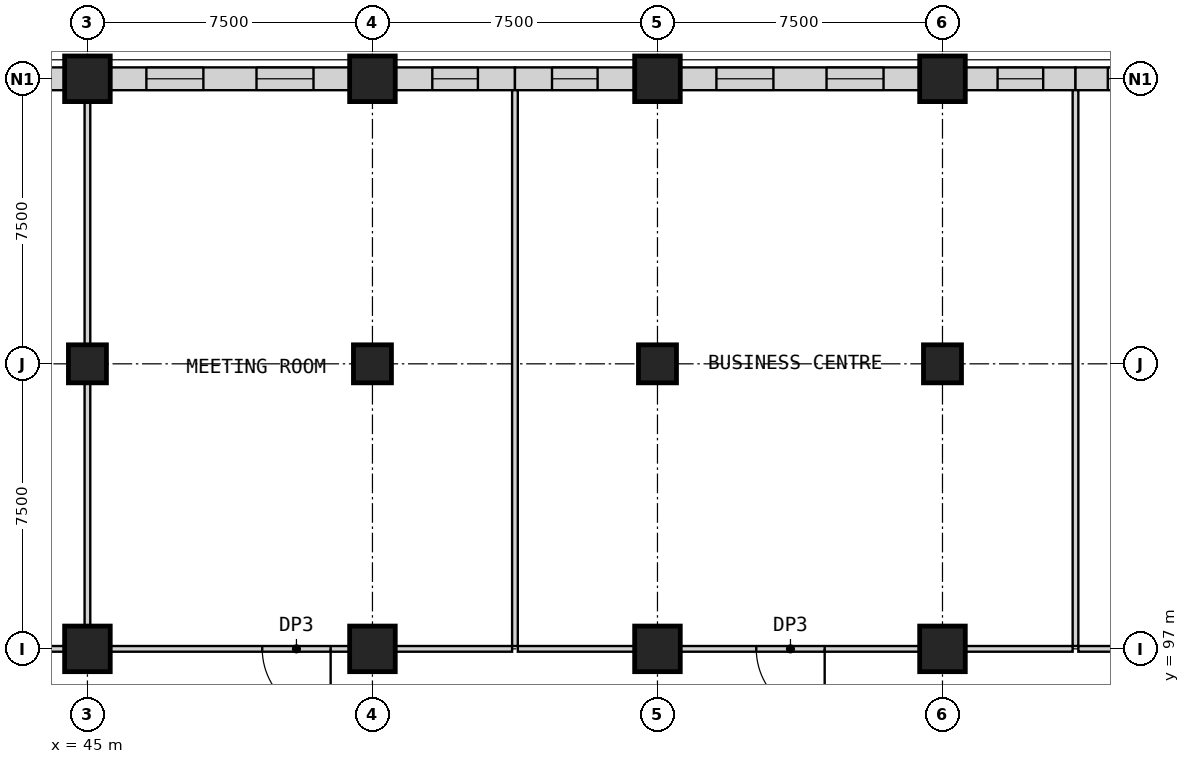
"""IFC4 building model, lengths in metres.
Left out: names, types, materials, properties, quantities, classifications, styles, units other than length and angle.
Written with IfcOpenShell. Run it as: python <this file> out.ifc"""

import sys

from ifc_helpers import new_model, si_unit, direction, frame, frame_2d, origin, origin_2d, place, context, subcontext, project, spatial, rectangle, extrude, element, fill, save


model = new_model("IFC4")
c1 = context("Model", 3, precision=1e-05, world=origin(), true_north=direction((0.0, 1.0)))
c2 = subcontext(c1, "Body", "Model", "MODEL_VIEW")
j1 = project(units=[si_unit("LENGTHUNIT", "METRE"), si_unit("PLANEANGLEUNIT", "RADIAN")], contexts=[c1])
p1 = place(None, origin())
s1 = spatial("IfcSite", under=j1, at=p1, CompositionType="ELEMENT")
p2 = place(p1, origin())
s2 = spatial("IfcBuilding", under=s1, at=p2, CompositionType="ELEMENT")
p3 = place(p2, frame((0.0, 0.0, 23.5)))
s3 = spatial("IfcBuildingStorey", under=s2, at=p3, CompositionType="ELEMENT", Elevation=23.5)
p4 = place(p3, frame((45.0, 97.0, 0.0), z_axis=(0.0, 0.0, 1.0), x_axis=(1.0, 0.0, 0.0)))
e1 = element("IfcColumn", 1, at=p4, inside=s3, PredefinedType="COLUMN", context=c2, shape_type="SweptSolid", body=[
    extrude(rectangle(XDim=1.2, YDim=1.2, at=origin_2d()), origin(), (0.0, 0.0, 1.0), 5.5),
])
p5 = place(p3, frame((45.0, 104.5, 0.0), z_axis=(0.0, 0.0, 1.0), x_axis=(1.0, 0.0, 0.0)))
e2 = element("IfcColumn", 2, at=p5, inside=s3, PredefinedType="COLUMN", context=c2, shape_type="SweptSolid", body=[
    extrude(rectangle(XDim=1.0, YDim=1.0, at=origin_2d()), origin(), (0.0, 0.0, 1.0), 5.5),
])
p6 = place(p3, frame((52.5, 97.0, 0.0), z_axis=(0.0, 0.0, 1.0), x_axis=(1.0, 0.0, 0.0)))
e3 = element("IfcColumn", 3, at=p6, inside=s3, PredefinedType="COLUMN", context=c2, shape_type="SweptSolid", body=[
    extrude(rectangle(XDim=1.2, YDim=1.2, at=origin_2d()), origin(), (0.0, 0.0, 1.0), 5.5),
])
p7 = place(p3, frame((52.5, 104.5, 0.0), z_axis=(0.0, 0.0, 1.0), x_axis=(1.0, 0.0, 0.0)))
e4 = element("IfcColumn", 4, at=p7, inside=s3, PredefinedType="COLUMN", context=c2, shape_type="SweptSolid", body=[
    extrude(rectangle(XDim=1.0, YDim=1.0, at=origin_2d()), origin(), (0.0, 0.0, 1.0), 5.5),
])
p8 = place(p3, frame((60.0, 97.0, 0.0), z_axis=(0.0, 0.0, 1.0), x_axis=(1.0, 0.0, 0.0)))
e5 = element("IfcColumn", 5, at=p8, inside=s3, PredefinedType="COLUMN", context=c2, shape_type="SweptSolid", body=[
    extrude(rectangle(XDim=1.2, YDim=1.2, at=origin_2d()), origin(), (0.0, 0.0, 1.0), 5.5),
])
p9 = place(p3, frame((60.0, 104.5, 0.0), z_axis=(0.0, 0.0, 1.0), x_axis=(1.0, 0.0, 0.0)))
e6 = element("IfcColumn", 6, at=p9, inside=s3, PredefinedType="COLUMN", context=c2, shape_type="SweptSolid", body=[
    extrude(rectangle(XDim=1.0, YDim=1.0, at=origin_2d()), origin(), (0.0, 0.0, 1.0), 5.5),
])
p10 = place(p3, frame((67.5, 97.0, 0.0), z_axis=(0.0, 0.0, 1.0), x_axis=(1.0, 0.0, 0.0)))
e7 = element("IfcColumn", 7, at=p10, inside=s3, PredefinedType="COLUMN", context=c2, shape_type="SweptSolid", body=[
    extrude(rectangle(XDim=1.2, YDim=1.2, at=origin_2d()), origin(), (0.0, 0.0, 1.0), 5.5),
])
p11 = place(p3, frame((67.5, 104.5, 0.0), z_axis=(0.0, 0.0, 1.0), x_axis=(1.0, 0.0, 0.0)))
e8 = element("IfcColumn", 8, at=p11, inside=s3, PredefinedType="COLUMN", context=c2, shape_type="SweptSolid", body=[
    extrude(rectangle(XDim=1.0, YDim=1.0, at=origin_2d()), origin(), (0.0, 0.0, 1.0), 5.5),
])
for number, where, z_axis, x_axis in (
    (9, (45.0, 112.0, 0.0), (0.0, 0.0, 1.0), (1.0, 0.0, 0.0)),
    (10, (52.5, 112.0, 0.0), (0.0, 0.0, 1.0), (1.0, 0.0, 0.0)),
    (11, (60.0, 112.0, 0.0), (0.0, 0.0, 1.0), (1.0, 0.0, 0.0)),
    (12, (67.5, 112.0, 0.0), (0.0, 0.0, 1.0), (1.0, 0.0, 0.0)),
):
    element("IfcColumn", number, at=place(p3, frame(where, z_axis=z_axis, x_axis=x_axis)), inside=s3, PredefinedType="COLUMN", context=c2, shape_type="SweptSolid", body=[
        extrude(rectangle(XDim=1.2, YDim=1.2, at=origin_2d()), origin(), (0.0, 0.0, 1.0), 5.5),
    ])
p12 = place(p3, frame((44.4, 97.0, 0.0), z_axis=(0.0, 0.0, 1.0), x_axis=(-1.0, 0.0, 0.0)))
e13 = element("IfcWall", 13, at=p12, inside=s3, PredefinedType="PARTITIONING", context=c2, shape_type="SweptSolid", body=[
    extrude(rectangle(XDim=6.3, YDim=0.15, at=frame_2d((3.15, 0.0))), origin(), (0.0, 0.0, 1.0), 5.2),
])
p13 = place(p12, frame((4.0, 0.0, 0.0)))
e14 = element("IfcOpeningElement", 14, at=p13, cuts=e13, PredefinedType="OPENING", context=c2, shape_type="SweptSolid", body=[
    extrude(rectangle(XDim=1.8, YDim=2.4, at=frame_2d((0.9, 1.2))), frame((0.0, 0.085, 0.0), z_axis=(0.0, -1.0, 0.0), x_axis=(1.0, 0.0, 0.0)), (0.0, 0.0, 1.0), 0.17),
])
p14 = place(p3, frame((51.9, 97.0, 0.0), z_axis=(0.0, 0.0, 1.0), x_axis=(-1.0, 0.0, 0.0)))
e15 = element("IfcWall", 15, at=p14, inside=s3, PredefinedType="PARTITIONING", context=c2, shape_type="SweptSolid", body=[
    extrude(rectangle(XDim=6.3, YDim=0.15, at=frame_2d((3.15, 0.0))), origin(), (0.0, 0.0, 1.0), 5.2),
])
p15 = place(p14, frame((0.5, 0.0, 0.0)))
e16 = element("IfcOpeningElement", 16, at=p15, cuts=e15, PredefinedType="OPENING", context=c2, shape_type="SweptSolid", body=[
    extrude(rectangle(XDim=1.8, YDim=2.4, at=frame_2d((0.9, 1.2))), frame((0.0, 0.085, 0.0), z_axis=(0.0, -1.0, 0.0), x_axis=(1.0, 0.0, 0.0)), (0.0, 0.0, 1.0), 0.17),
])
for number, where, z_axis, x_axis in (
    (17, (53.1, 97.0, 0.0), (0.0, 0.0, 1.0), (1.0, 0.0, 0.0)),
    (18, (56.325, 97.0, 0.0), (0.0, 0.0, 1.0), (1.0, 0.0, 0.0)),
):
    element("IfcWall", number, at=place(p3, frame(where, z_axis=z_axis, x_axis=x_axis)), inside=s3, PredefinedType="PARTITIONING", context=c2, shape_type="SweptSolid", body=[
        extrude(rectangle(XDim=3.075, YDim=0.15, at=frame_2d((1.538, 0.0))), origin(), (0.0, 0.0, 1.0), 5.2),
    ])
p16 = place(p3, frame((66.9, 97.0, 0.0), z_axis=(0.0, 0.0, 1.0), x_axis=(-1.0, 0.0, 0.0)))
e19 = element("IfcWall", 19, at=p16, inside=s3, PredefinedType="PARTITIONING", context=c2, shape_type="SweptSolid", body=[
    extrude(rectangle(XDim=6.3, YDim=0.15, at=frame_2d((3.15, 0.0))), origin(), (0.0, 0.0, 1.0), 5.2),
])
p17 = place(p16, frame((2.5, 0.0, 0.0)))
e20 = element("IfcOpeningElement", 20, at=p17, cuts=e19, PredefinedType="OPENING", context=c2, shape_type="SweptSolid", body=[
    extrude(rectangle(XDim=1.8, YDim=2.4, at=frame_2d((0.9, 1.2))), frame((0.0, 0.085, 0.0), z_axis=(0.0, -1.0, 0.0), x_axis=(1.0, 0.0, 0.0)), (0.0, 0.0, 1.0), 0.17),
])
for number, where, z_axis, x_axis in (
    (21, (68.1, 97.0, 0.0), (0.0, 0.0, 1.0), (1.0, 0.0, 0.0)),
    (22, (71.075, 97.0, 0.0), (0.0, 0.0, 1.0), (1.0, 0.0, 0.0)),
):
    element("IfcWall", number, at=place(p3, frame(where, z_axis=z_axis, x_axis=x_axis)), inside=s3, PredefinedType="PARTITIONING", context=c2, shape_type="SweptSolid", body=[
        extrude(rectangle(XDim=2.825, YDim=0.15, at=frame_2d((1.413, 0.0))), origin(), (0.0, 0.0, 1.0), 5.2),
    ])
p18 = place(p3, frame((38.1, 112.0, 0.0), z_axis=(0.0, 0.0, 1.0), x_axis=(1.0, 0.0, 0.0)))
e23 = element("IfcWall", 23, at=p18, inside=s3, PredefinedType="PARTITIONING", context=c2, shape_type="SweptSolid", body=[
    extrude(rectangle(XDim=6.3, YDim=0.6, at=frame_2d((3.15, 0.0))), origin(), (0.0, 0.0, 1.0), 4.6),
])
p19 = place(p18, frame((0.951, 0.0, 0.9)))
e24 = element("IfcOpeningElement", 24, at=p19, cuts=e23, PredefinedType="OPENING", context=c2, shape_type="SweptSolid", body=[
    extrude(rectangle(XDim=1.5, YDim=2.8, at=frame_2d((0.75, 1.4))), frame((0.0, 0.31, 0.0), z_axis=(0.0, -1.0, 0.0), x_axis=(1.0, 0.0, 0.0)), (0.0, 0.0, 1.0), 0.62),
])
p20 = place(p18, frame((3.849, 0.0, 0.9)))
e25 = element("IfcOpeningElement", 25, at=p20, cuts=e23, PredefinedType="OPENING", context=c2, shape_type="SweptSolid", body=[
    extrude(rectangle(XDim=1.5, YDim=2.8, at=frame_2d((0.75, 1.4))), frame((0.0, 0.31, 0.0), z_axis=(0.0, -1.0, 0.0), x_axis=(1.0, 0.0, 0.0)), (0.0, 0.0, 1.0), 0.62),
])
p21 = place(p3, frame((45.6, 112.0, 0.0), z_axis=(0.0, 0.0, 1.0), x_axis=(1.0, 0.0, 0.0)))
e26 = element("IfcWall", 26, at=p21, inside=s3, PredefinedType="PARTITIONING", context=c2, shape_type="SweptSolid", body=[
    extrude(rectangle(XDim=6.3, YDim=0.6, at=frame_2d((3.15, 0.0))), origin(), (0.0, 0.0, 1.0), 4.6),
])
p22 = place(p21, frame((0.951, 0.0, 0.9)))
e27 = element("IfcOpeningElement", 27, at=p22, cuts=e26, PredefinedType="OPENING", context=c2, shape_type="SweptSolid", body=[
    extrude(rectangle(XDim=1.5, YDim=2.8, at=frame_2d((0.75, 1.4))), frame((0.0, 0.31, 0.0), z_axis=(0.0, -1.0, 0.0), x_axis=(1.0, 0.0, 0.0)), (0.0, 0.0, 1.0), 0.62),
])
p23 = place(p21, frame((3.849, 0.0, 0.9)))
e28 = element("IfcOpeningElement", 28, at=p23, cuts=e26, PredefinedType="OPENING", context=c2, shape_type="SweptSolid", body=[
    extrude(rectangle(XDim=1.5, YDim=2.8, at=frame_2d((0.75, 1.4))), frame((0.0, 0.31, 0.0), z_axis=(0.0, -1.0, 0.0), x_axis=(1.0, 0.0, 0.0)), (0.0, 0.0, 1.0), 0.62),
])
p24 = place(p3, frame((53.1, 112.0, 0.0), z_axis=(0.0, 0.0, 1.0), x_axis=(1.0, 0.0, 0.0)))
e29 = element("IfcWall", 29, at=p24, inside=s3, PredefinedType="PARTITIONING", context=c2, shape_type="SweptSolid", body=[
    extrude(rectangle(XDim=3.15, YDim=0.6, at=frame_2d((1.575, 0.0))), origin(), (0.0, 0.0, 1.0), 4.6),
])
p25 = place(p24, frame((0.975, 0.0, 0.9)))
e30 = element("IfcOpeningElement", 30, at=p25, cuts=e29, PredefinedType="OPENING", context=c2, shape_type="SweptSolid", body=[
    extrude(rectangle(XDim=1.2, YDim=2.8, at=frame_2d((0.6, 1.4))), frame((0.0, 0.31, 0.0), z_axis=(0.0, -1.0, 0.0), x_axis=(1.0, 0.0, 0.0)), (0.0, 0.0, 1.0), 0.62),
])
p26 = place(p3, frame((56.25, 112.0, 0.0), z_axis=(0.0, 0.0, 1.0), x_axis=(1.0, 0.0, 0.0)))
e31 = element("IfcWall", 31, at=p26, inside=s3, PredefinedType="PARTITIONING", context=c2, shape_type="SweptSolid", body=[
    extrude(rectangle(XDim=3.15, YDim=0.6, at=frame_2d((1.575, 0.0))), origin(), (0.0, 0.0, 1.0), 4.6),
])
p27 = place(p26, frame((0.975, 0.0, 0.9)))
e32 = element("IfcOpeningElement", 32, at=p27, cuts=e31, PredefinedType="OPENING", context=c2, shape_type="SweptSolid", body=[
    extrude(rectangle(XDim=1.2, YDim=2.8, at=frame_2d((0.6, 1.4))), frame((0.0, 0.31, 0.0), z_axis=(0.0, -1.0, 0.0), x_axis=(1.0, 0.0, 0.0)), (0.0, 0.0, 1.0), 0.62),
])
p28 = place(p3, frame((60.6, 112.0, 0.0), z_axis=(0.0, 0.0, 1.0), x_axis=(1.0, 0.0, 0.0)))
e33 = element("IfcWall", 33, at=p28, inside=s3, PredefinedType="PARTITIONING", context=c2, shape_type="SweptSolid", body=[
    extrude(rectangle(XDim=6.3, YDim=0.6, at=frame_2d((3.15, 0.0))), origin(), (0.0, 0.0, 1.0), 4.6),
])
p29 = place(p28, frame((0.951, 0.0, 0.9)))
e34 = element("IfcOpeningElement", 34, at=p29, cuts=e33, PredefinedType="OPENING", context=c2, shape_type="SweptSolid", body=[
    extrude(rectangle(XDim=1.5, YDim=2.8, at=frame_2d((0.75, 1.4))), frame((0.0, 0.31, 0.0), z_axis=(0.0, -1.0, 0.0), x_axis=(1.0, 0.0, 0.0)), (0.0, 0.0, 1.0), 0.62),
])
p30 = place(p28, frame((3.849, 0.0, 0.9)))
e35 = element("IfcOpeningElement", 35, at=p30, cuts=e33, PredefinedType="OPENING", context=c2, shape_type="SweptSolid", body=[
    extrude(rectangle(XDim=1.5, YDim=2.8, at=frame_2d((0.75, 1.4))), frame((0.0, 0.31, 0.0), z_axis=(0.0, -1.0, 0.0), x_axis=(1.0, 0.0, 0.0)), (0.0, 0.0, 1.0), 0.62),
])
p31 = place(p3, frame((68.1, 112.0, 0.0), z_axis=(0.0, 0.0, 1.0), x_axis=(1.0, 0.0, 0.0)))
e36 = element("IfcWall", 36, at=p31, inside=s3, PredefinedType="PARTITIONING", context=c2, shape_type="SweptSolid", body=[
    extrude(rectangle(XDim=2.9, YDim=0.6, at=frame_2d((1.45, 0.0))), origin(), (0.0, 0.0, 1.0), 4.6),
])
p32 = place(p31, frame((0.85, 0.0, 0.9)))
e37 = element("IfcOpeningElement", 37, at=p32, cuts=e36, PredefinedType="OPENING", context=c2, shape_type="SweptSolid", body=[
    extrude(rectangle(XDim=1.2, YDim=2.8, at=frame_2d((0.6, 1.4))), frame((0.0, 0.31, 0.0), z_axis=(0.0, -1.0, 0.0), x_axis=(1.0, 0.0, 0.0)), (0.0, 0.0, 1.0), 0.62),
])
p33 = place(p3, frame((71.0, 112.0, 0.0), z_axis=(0.0, 0.0, 1.0), x_axis=(1.0, 0.0, 0.0)))
e38 = element("IfcWall", 38, at=p33, inside=s3, PredefinedType="PARTITIONING", context=c2, shape_type="SweptSolid", body=[
    extrude(rectangle(XDim=2.9, YDim=0.6, at=frame_2d((1.45, 0.0))), origin(), (0.0, 0.0, 1.0), 4.6),
])
p34 = place(p33, frame((0.85, 0.0, 0.9)))
e39 = element("IfcOpeningElement", 39, at=p34, cuts=e38, PredefinedType="OPENING", context=c2, shape_type="SweptSolid", body=[
    extrude(rectangle(XDim=1.2, YDim=2.8, at=frame_2d((0.6, 1.4))), frame((0.0, 0.31, 0.0), z_axis=(0.0, -1.0, 0.0), x_axis=(1.0, 0.0, 0.0)), (0.0, 0.0, 1.0), 0.62),
])
for number, where, z_axis, x_axis in (
    (40, (45.0, 97.6, 0.0), (0.0, 0.0, 1.0), (0.0, 1.0, 0.0)),
    (41, (45.0, 105.0, 0.0), (0.0, 0.0, 1.0), (0.0, 1.0, 0.0)),
):
    element("IfcWall", number, at=place(p3, frame(where, z_axis=z_axis, x_axis=x_axis)), inside=s3, PredefinedType="PARTITIONING", context=c2, shape_type="SweptSolid", body=[
        extrude(rectangle(XDim=6.4, YDim=0.15, at=frame_2d((3.2, 0.0))), origin(), (0.0, 0.0, 1.0), 5.2),
    ])
for number, where, z_axis, x_axis in (
    (42, (71.0, 97.075, 0.0), (0.0, 0.0, 1.0), (0.0, 1.0, 0.0)),
    (43, (56.25, 97.075, 0.0), (0.0, 0.0, 1.0), (0.0, 1.0, 0.0)),
):
    element("IfcWall", number, at=place(p3, frame(where, z_axis=z_axis, x_axis=x_axis)), inside=s3, PredefinedType="PARTITIONING", context=c2, shape_type="SweptSolid", body=[
        extrude(rectangle(XDim=14.625, YDim=0.15, at=frame_2d((7.312, 0.0))), origin(), (0.0, 0.0, 1.0), 5.2),
    ])
p35 = place(p15, origin())
e44 = element("IfcDoor", 44, at=p35, inside=s3, OperationType="SINGLE_SWING_LEFT", PredefinedType="DOOR", context=c2, shape_type="SweptSolid", body=[
    extrude(rectangle(XDim=1.8, YDim=2.4, at=frame_2d((0.9, 1.2))), frame((0.0, 0.025, 0.0), z_axis=(0.0, -1.0, 0.0), x_axis=(1.0, 0.0, 0.0)), (0.0, 0.0, 1.0), 0.05),
])
fill(e16, e44)
p36 = place(p17, origin())
e45 = element("IfcDoor", 45, at=p36, inside=s3, OperationType="SINGLE_SWING_LEFT", PredefinedType="DOOR", context=c2, shape_type="SweptSolid", body=[
    extrude(rectangle(XDim=1.8, YDim=2.4, at=frame_2d((0.9, 1.2))), frame((0.0, 0.025, 0.0), z_axis=(0.0, -1.0, 0.0), x_axis=(1.0, 0.0, 0.0)), (0.0, 0.0, 1.0), 0.05),
])
fill(e20, e45)
p37 = place(p22, origin())
e46 = element("IfcWindow", 46, at=p37, inside=s3, PartitioningType="SINGLE_PANEL", PredefinedType="WINDOW", context=c2, shape_type="SweptSolid", body=[
    extrude(rectangle(XDim=1.5, YDim=2.8, at=frame_2d((0.75, 1.4))), frame((0.0, 0.03, 0.0), z_axis=(0.0, -1.0, 0.0), x_axis=(1.0, 0.0, 0.0)), (0.0, 0.0, 1.0), 0.06),
])
fill(e27, e46)
p38 = place(p23, origin())
e47 = element("IfcWindow", 47, at=p38, inside=s3, PartitioningType="SINGLE_PANEL", PredefinedType="WINDOW", context=c2, shape_type="SweptSolid", body=[
    extrude(rectangle(XDim=1.5, YDim=2.8, at=frame_2d((0.75, 1.4))), frame((0.0, 0.03, 0.0), z_axis=(0.0, -1.0, 0.0), x_axis=(1.0, 0.0, 0.0)), (0.0, 0.0, 1.0), 0.06),
])
fill(e28, e47)
p39 = place(p25, origin())
e48 = element("IfcWindow", 48, at=p39, inside=s3, PartitioningType="SINGLE_PANEL", PredefinedType="WINDOW", context=c2, shape_type="SweptSolid", body=[
    extrude(rectangle(XDim=1.2, YDim=2.8, at=frame_2d((0.6, 1.4))), frame((0.0, 0.03, 0.0), z_axis=(0.0, -1.0, 0.0), x_axis=(1.0, 0.0, 0.0)), (0.0, 0.0, 1.0), 0.06),
])
fill(e30, e48)
p40 = place(p27, origin())
e49 = element("IfcWindow", 49, at=p40, inside=s3, PartitioningType="SINGLE_PANEL", PredefinedType="WINDOW", context=c2, shape_type="SweptSolid", body=[
    extrude(rectangle(XDim=1.2, YDim=2.8, at=frame_2d((0.6, 1.4))), frame((0.0, 0.03, 0.0), z_axis=(0.0, -1.0, 0.0), x_axis=(1.0, 0.0, 0.0)), (0.0, 0.0, 1.0), 0.06),
])
fill(e32, e49)
p41 = place(p29, origin())
e50 = element("IfcWindow", 50, at=p41, inside=s3, PartitioningType="SINGLE_PANEL", PredefinedType="WINDOW", context=c2, shape_type="SweptSolid", body=[
    extrude(rectangle(XDim=1.5, YDim=2.8, at=frame_2d((0.75, 1.4))), frame((0.0, 0.03, 0.0), z_axis=(0.0, -1.0, 0.0), x_axis=(1.0, 0.0, 0.0)), (0.0, 0.0, 1.0), 0.06),
])
fill(e34, e50)
p42 = place(p30, origin())
e51 = element("IfcWindow", 51, at=p42, inside=s3, PartitioningType="SINGLE_PANEL", PredefinedType="WINDOW", context=c2, shape_type="SweptSolid", body=[
    extrude(rectangle(XDim=1.5, YDim=2.8, at=frame_2d((0.75, 1.4))), frame((0.0, 0.03, 0.0), z_axis=(0.0, -1.0, 0.0), x_axis=(1.0, 0.0, 0.0)), (0.0, 0.0, 1.0), 0.06),
])
fill(e35, e51)
p43 = place(p32, origin())
e52 = element("IfcWindow", 52, at=p43, inside=s3, PartitioningType="SINGLE_PANEL", PredefinedType="WINDOW", context=c2, shape_type="SweptSolid", body=[
    extrude(rectangle(XDim=1.2, YDim=2.8, at=frame_2d((0.6, 1.4))), frame((0.0, 0.03, 0.0), z_axis=(0.0, -1.0, 0.0), x_axis=(1.0, 0.0, 0.0)), (0.0, 0.0, 1.0), 0.06),
])
fill(e37, e52)
p44 = place(p34, origin())
e53 = element("IfcWindow", 53, at=p44, inside=s3, PartitioningType="SINGLE_PANEL", PredefinedType="WINDOW", context=c2, shape_type="SweptSolid", body=[
    extrude(rectangle(XDim=1.2, YDim=2.8, at=frame_2d((0.6, 1.4))), frame((0.0, 0.03, 0.0), z_axis=(0.0, -1.0, 0.0), x_axis=(1.0, 0.0, 0.0)), (0.0, 0.0, 1.0), 0.06),
])
fill(e39, e53)
save(model, sys.argv[1])
